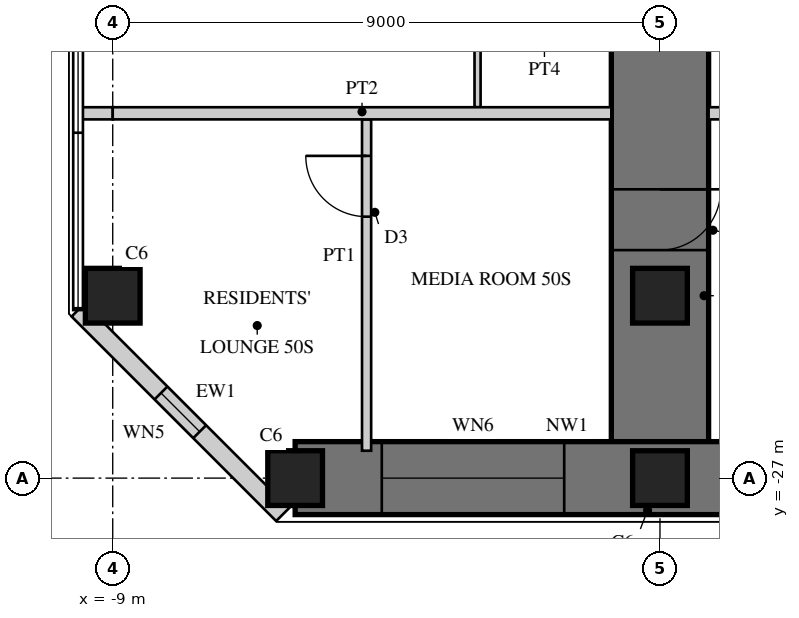
"""IFC4 building model, lengths in metres.
Left out: names, types, materials, properties, quantities, classifications, styles, units other than length and angle.
Written with IfcOpenShell. Run it as: python <this file> out.ifc"""

import sys

from ifc_helpers import new_model, si_unit, direction, frame, frame_2d, origin, origin_2d, place, context, subcontext, project, spatial, rectangle, hollow_rectangle, extrude, element, fill, save


model = new_model("IFC4")
c1 = context("Model", 3, precision=1e-05, world=origin(), true_north=direction((0.0, 1.0)))
c2 = subcontext(c1, "Body", "Model", "MODEL_VIEW")
j1 = project(units=[si_unit("LENGTHUNIT", "METRE"), si_unit("PLANEANGLEUNIT", "RADIAN")], contexts=[c1])
p1 = place(None, origin())
s1 = spatial("IfcSite", under=j1, at=p1, CompositionType="ELEMENT")
p2 = place(p1, origin())
s2 = spatial("IfcBuilding", under=s1, at=p2, CompositionType="ELEMENT")
p3 = place(p2, frame((0.0, 0.0, 200.1)))
s3 = spatial("IfcBuildingStorey", under=s2, at=p3, CompositionType="ELEMENT", Elevation=200.1)
p4 = place(p3, frame((0.0, -9.0, 0.0), z_axis=(0.0, 0.0, 1.0), x_axis=(0.0, -1.0, 0.0)))
e1 = element("IfcWall", 1, at=p4, inside=s3, PredefinedType="SHEAR", context=c2, shape_type="SweptSolid", body=[
    extrude(rectangle(XDim=18.0, YDim=1.6, at=frame_2d((9.0, 0.0))), origin(), (0.0, 0.0, 1.0), 3.4),
])
p5 = place(p4, frame((3.95, 0.0, 0.0)))
e2 = element("IfcOpeningElement", 2, at=p5, cuts=e1, PredefinedType="OPENING", context=c2, shape_type="SweptSolid", body=[
    extrude(rectangle(XDim=1.0, YDim=2.15, at=frame_2d((0.5, 1.075))), frame((0.0, 0.81, 0.0), z_axis=(0.0, -1.0, 0.0), x_axis=(1.0, 0.0, 0.0)), (0.0, 0.0, 1.0), 1.62),
])
p6 = place(p4, frame((6.6, 0.0, 0.0)))
e3 = element("IfcOpeningElement", 3, at=p6, cuts=e1, PredefinedType="OPENING", context=c2, shape_type="SweptSolid", body=[
    extrude(rectangle(XDim=1.0, YDim=2.15, at=frame_2d((0.5, 1.075))), frame((0.0, 0.81, 0.0), z_axis=(0.0, -1.0, 0.0), x_axis=(1.0, 0.0, 0.0)), (0.0, 0.0, 1.0), 1.62),
])
p7 = place(p4, frame((13.25, 0.0, 0.0)))
e4 = element("IfcOpeningElement", 4, at=p7, cuts=e1, PredefinedType="OPENING", context=c2, shape_type="SweptSolid", body=[
    extrude(rectangle(XDim=1.0, YDim=2.2, at=frame_2d((0.5, 1.1))), frame((0.0, 0.81, 0.0), z_axis=(0.0, -1.0, 0.0), x_axis=(1.0, 0.0, 0.0)), (0.0, 0.0, 1.0), 1.62),
])
p8 = place(p3, frame((-6.0, -27.0, 0.0), z_axis=(0.0, 0.0, 1.0), x_axis=(1.0, 0.0, 0.0)))
e5 = element("IfcWall", 5, at=p8, inside=s3, PredefinedType="SHEAR", context=c2, shape_type="SweptSolid", body=[
    extrude(rectangle(XDim=12.0, YDim=1.2, at=frame_2d((6.0, 0.0))), origin(), (0.0, 0.0, 1.0), 3.4),
])
p9 = place(p8, frame((1.425, 0.0, 0.6)))
e6 = element("IfcOpeningElement", 6, at=p9, cuts=e5, PredefinedType="OPENING", context=c2, shape_type="SweptSolid", body=[
    extrude(rectangle(XDim=3.0, YDim=2.4, at=frame_2d((1.5, 1.2))), frame((0.0, 0.61, 0.0), z_axis=(0.0, -1.0, 0.0), x_axis=(1.0, 0.0, 0.0)), (0.0, 0.0, 1.0), 1.22),
])
p10 = place(p8, frame((7.575, 0.0, 0.6)))
e7 = element("IfcOpeningElement", 7, at=p10, cuts=e5, PredefinedType="OPENING", context=c2, shape_type="SweptSolid", body=[
    extrude(rectangle(XDim=3.0, YDim=2.4, at=frame_2d((1.5, 1.2))), frame((0.0, 0.61, 0.0), z_axis=(0.0, -1.0, 0.0), x_axis=(1.0, 0.0, 0.0)), (0.0, 0.0, 1.0), 1.22),
])
for number, where, z_axis, x_axis in (
    (8, (-9.0, -24.0, 0.0), (0.0, 0.0, 1.0), (1.0, 0.0, 0.0)),
    (9, (-6.0, -27.0, 0.0), (0.0, 0.0, 1.0), (1.0, 0.0, 0.0)),
    (10, (0.0, -27.0, 0.0), (0.0, 0.0, 1.0), (1.0, 0.0, 0.0)),
    (11, (0.0, -24.0, 0.0), (0.0, 0.0, 1.0), (1.0, 0.0, 0.0)),
):
    element("IfcColumn", number, at=place(p3, frame(where, z_axis=z_axis, x_axis=x_axis)), inside=s3, PredefinedType="COLUMN", context=c2, shape_type="SweptSolid", body=[
        extrude(rectangle(XDim=0.9, YDim=0.9, at=origin_2d()), origin(), (0.0, 0.0, 1.0), 3.4),
    ])
p11 = place(p3, frame((-9.57, -24.236, 0.0), z_axis=(0.0, 0.0, 1.0), x_axis=(0.707106781187, -0.707106781187, 0.0)))
e12 = element("IfcWall", 12, at=p11, inside=s3, PredefinedType="SOLIDWALL", context=c2, shape_type="SweptSolid", body=[
    extrude(rectangle(XDim=4.757, YDim=0.3, at=frame_2d((2.379, 0.0))), origin(), (0.0, 0.0, 1.0), 3.22),
])
p12 = place(p11, frame((1.929, 0.0, 0.3)))
e13 = element("IfcOpeningElement", 13, at=p12, cuts=e12, PredefinedType="OPENING", context=c2, shape_type="SweptSolid", body=[
    extrude(rectangle(XDim=0.9, YDim=2.4, at=frame_2d((0.45, 1.2))), frame((0.0, 0.16, 0.0), z_axis=(0.0, -1.0, 0.0), x_axis=(1.0, 0.0, 0.0)), (0.0, 0.0, 1.0), 0.32),
])
p13 = place(p3, frame((-3.0, -18.45, 0.0), z_axis=(0.0, 0.0, 1.0), x_axis=(0.0, -1.0, 0.0)))
e14 = element("IfcWall", 14, at=p13, inside=s3, PredefinedType="PARTITIONING", context=c2, shape_type="SweptSolid", body=[
    extrude(rectangle(XDim=2.45, YDim=0.1, at=frame_2d((1.225, 0.0))), origin(), (0.0, 0.0, 1.0), 3.22),
])
p14 = place(p3, frame((-4.825, -21.1, 0.0), z_axis=(0.0, 0.0, 1.0), x_axis=(0.0, -1.0, 0.0)))
e15 = element("IfcWall", 15, at=p14, inside=s3, PredefinedType="PARTITIONING", context=c2, shape_type="SweptSolid", body=[
    extrude(rectangle(XDim=5.45, YDim=0.15, at=frame_2d((2.725, 0.0))), origin(), (0.0, 0.0, 1.0), 3.22),
])
p15 = place(p14, frame((0.6, 0.0, 0.0)))
e16 = element("IfcOpeningElement", 16, at=p15, cuts=e15, PredefinedType="OPENING", context=c2, shape_type="SweptSolid", body=[
    extrude(rectangle(XDim=1.0, YDim=2.1, at=frame_2d((0.5, 1.05))), frame((0.0, 0.085, 0.0), z_axis=(0.0, -1.0, 0.0), x_axis=(1.0, 0.0, 0.0)), (0.0, 0.0, 1.0), 0.17),
])
p16 = place(p3, frame((-9.53, -21.0, 0.0), z_axis=(0.0, 0.0, 1.0), x_axis=(1.0, 0.0, 0.0)))
e17 = element("IfcWall", 17, at=p16, inside=s3, PredefinedType="SOLIDWALL", context=c2, shape_type="SweptSolid", body=[
    extrude(rectangle(XDim=0.53, YDim=0.2, at=frame_2d((0.265, 0.0))), origin(), (0.0, 0.0, 1.0), 3.22),
])
p17 = place(p3, frame((-9.0, -21.0, 0.0), z_axis=(0.0, 0.0, 1.0), x_axis=(1.0, 0.0, 0.0)))
e18 = element("IfcWall", 18, at=p17, inside=s3, PredefinedType="SOLIDWALL", context=c2, shape_type="SweptSolid", body=[
    extrude(rectangle(XDim=8.2, YDim=0.2, at=frame_2d((4.1, 0.0))), origin(), (0.0, 0.0, 1.0), 2.62),
])
p18 = place(p3, frame((0.8, -21.0, 0.0), z_axis=(0.0, 0.0, 1.0), x_axis=(1.0, 0.0, 0.0)))
e19 = element("IfcWall", 19, at=p18, inside=s3, PredefinedType="SOLIDWALL", context=c2, shape_type="SweptSolid", body=[
    extrude(rectangle(XDim=8.2, YDim=0.2, at=frame_2d((4.1, 0.0))), origin(), (0.0, 0.0, 1.0), 2.62),
])
p19 = place(p18, frame((0.35, 0.0, 0.0)))
e20 = element("IfcOpeningElement", 20, at=p19, cuts=e19, PredefinedType="OPENING", context=c2, shape_type="SweptSolid", body=[
    extrude(rectangle(XDim=1.0, YDim=2.2, at=frame_2d((0.5, 1.1))), frame((0.0, 0.11, 0.0), z_axis=(0.0, -1.0, 0.0), x_axis=(1.0, 0.0, 0.0)), (0.0, 0.0, 1.0), 0.22),
])
p20 = place(p12, origin())
e21 = element("IfcWindow", 21, at=p20, inside=s3, PartitioningType="SINGLE_PANEL", PredefinedType="WINDOW", context=c2, shape_type="SweptSolid", body=[
    extrude(hollow_rectangle(XDim=0.9, YDim=2.4, WallThickness=0.06, at=frame_2d((0.45, 1.2))), frame((0.0, 0.03, 0.0), z_axis=(0.0, -1.0, 0.0), x_axis=(1.0, 0.0, 0.0)), (0.0, 0.0, 1.0), 0.06),
    extrude(rectangle(XDim=0.779, YDim=2.279, at=frame_2d((0.45, 1.2))), frame((0.0, 0.03, 0.0), z_axis=(0.0, -1.0, 0.0), x_axis=(1.0, 0.0, 0.0)), (0.0, 0.0, 1.0), 0.06),
])
fill(e13, e21)
p21 = place(p9, origin())
e22 = element("IfcWindow", 22, at=p21, inside=s3, PartitioningType="SINGLE_PANEL", PredefinedType="WINDOW", context=c2, shape_type="SweptSolid", body=[
    extrude(hollow_rectangle(XDim=3.0, YDim=2.4, WallThickness=0.06, at=frame_2d((1.5, 1.2))), frame((0.0, 0.03, 0.0), z_axis=(0.0, -1.0, 0.0), x_axis=(1.0, 0.0, 0.0)), (0.0, 0.0, 1.0), 0.06),
    extrude(rectangle(XDim=2.879, YDim=2.279, at=frame_2d((1.5, 1.2))), frame((0.0, 0.03, 0.0), z_axis=(0.0, -1.0, 0.0), x_axis=(1.0, 0.0, 0.0)), (0.0, 0.0, 1.0), 0.06),
])
fill(e6, e22)
p22 = place(p15, frame((1.0, 0.0, 0.0), z_axis=(0.0, 0.0, 1.0), x_axis=(-1.0, 0.0, 0.0)))
e23 = element("IfcDoor", 23, at=p22, inside=s3, OperationType="SINGLE_SWING_RIGHT", PredefinedType="DOOR", context=c2, shape_type="SweptSolid", body=[
    extrude(rectangle(XDim=1.0, YDim=2.1, at=frame_2d((0.5, 1.05))), frame((0.0, 0.025, 0.0), z_axis=(0.0, -1.0, 0.0), x_axis=(1.0, 0.0, 0.0)), (0.0, 0.0, 1.0), 0.05),
])
fill(e16, e23)
p23 = place(p7, origin())
e24 = element("IfcDoor", 24, at=p23, inside=s3, OperationType="SINGLE_SWING_LEFT", PredefinedType="DOOR", context=c2, shape_type="SweptSolid", body=[
    extrude(rectangle(XDim=1.0, YDim=2.2, at=frame_2d((0.5, 1.1))), frame((0.0, 0.025, 0.0), z_axis=(0.0, -1.0, 0.0), x_axis=(1.0, 0.0, 0.0)), (0.0, 0.0, 1.0), 0.05),
])
fill(e4, e24)
save(model, sys.argv[1])
